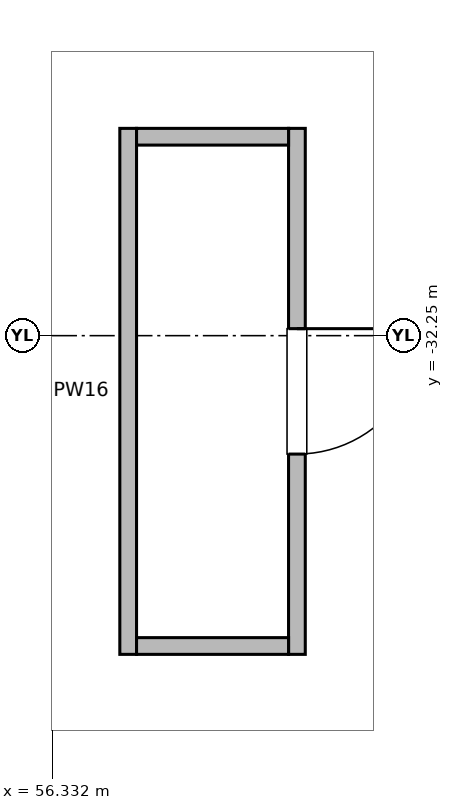
"""IFC4 building model, lengths in metres.
Left out: names, types, materials, properties, quantities, classifications, styles, units other than length and angle.
Written with IfcOpenShell. Run it as: python <this file> out.ifc"""

import sys

from ifc_helpers import new_model, si_unit, direction, frame, frame_2d, origin, place, context, subcontext, project, spatial, rectangle, extrude, element, fill, save


model = new_model("IFC4")
c1 = context("Model", 3, precision=1e-05, world=origin(), true_north=direction((0.0, 1.0)))
c2 = subcontext(c1, "Body", "Model", "MODEL_VIEW")
j1 = project(units=[si_unit("LENGTHUNIT", "METRE"), si_unit("PLANEANGLEUNIT", "RADIAN")], contexts=[c1])
p1 = place(None, origin())
s1 = spatial("IfcSite", under=j1, at=p1, CompositionType="ELEMENT")
p2 = place(p1, origin())
s2 = spatial("IfcBuilding", under=s1, at=p2, CompositionType="ELEMENT")
p3 = place(p2, frame((0.0, 0.0, 6.0)))
s3 = spatial("IfcBuildingStorey", under=s2, at=p3, CompositionType="ELEMENT", Elevation=6.0)
p4 = place(p3, frame((59.552, -29.523, 0.0), z_axis=(0.0, 0.0, 1.0), x_axis=(0.0, -1.0, 0.0)))
e1 = element("IfcWall", 1, at=p4, inside=s3, PredefinedType="PARTITIONING", context=c2, shape_type="SweptSolid", body=[
    extrude(rectangle(XDim=6.92, YDim=0.22, at=frame_2d((3.46, 0.0))), origin(), (0.0, 0.0, 1.0), 4.42),
])
p5 = place(p4, frame((2.635, 0.0, 0.0)))
e2 = element("IfcOpeningElement", 2, at=p5, cuts=e1, PredefinedType="OPENING", context=c2, shape_type="SweptSolid", body=[
    extrude(rectangle(XDim=1.65, YDim=2.3, at=frame_2d((0.825, 1.15))), frame((0.0, 0.12, 0.0), z_axis=(0.0, -1.0, 0.0), x_axis=(1.0, 0.0, 0.0)), (0.0, 0.0, 1.0), 0.24),
])
p6 = place(p3, frame((57.332, -36.443, 0.0), z_axis=(0.0, 0.0, 1.0), x_axis=(0.0, 1.0, 0.0)))
e3 = element("IfcWall", 3, at=p6, inside=s3, PredefinedType="PARTITIONING", context=c2, shape_type="SweptSolid", body=[
    extrude(rectangle(XDim=6.92, YDim=0.22, at=frame_2d((3.46, 0.0))), origin(), (0.0, 0.0, 1.0), 4.42),
])
for number, where, z_axis, x_axis in (
    (4, (57.442, -36.333, 0.0), (0.0, 0.0, 1.0), (1.0, 0.0, 0.0)),
    (5, (57.442, -29.633, 0.0), (0.0, 0.0, 1.0), (1.0, 0.0, 0.0)),
):
    element("IfcWall", number, at=place(p3, frame(where, z_axis=z_axis, x_axis=x_axis)), inside=s3, PredefinedType="PARTITIONING", context=c2, shape_type="SweptSolid", body=[
        extrude(rectangle(XDim=2.0, YDim=0.22, at=frame_2d((1.0, 0.0))), origin(), (0.0, 0.0, 1.0), 4.42),
    ])
p7 = place(p5, origin())
e6 = element("IfcDoor", 6, at=p7, inside=s3, OperationType="SINGLE_SWING_LEFT", PredefinedType="DOOR", context=c2, shape_type="SweptSolid", body=[
    extrude(rectangle(XDim=1.65, YDim=2.3, at=frame_2d((0.825, 1.15))), frame((0.0, 0.025, 0.0), z_axis=(0.0, -1.0, 0.0), x_axis=(1.0, 0.0, 0.0)), (0.0, 0.0, 1.0), 0.05),
])
fill(e2, e6)
save(model, sys.argv[1])
